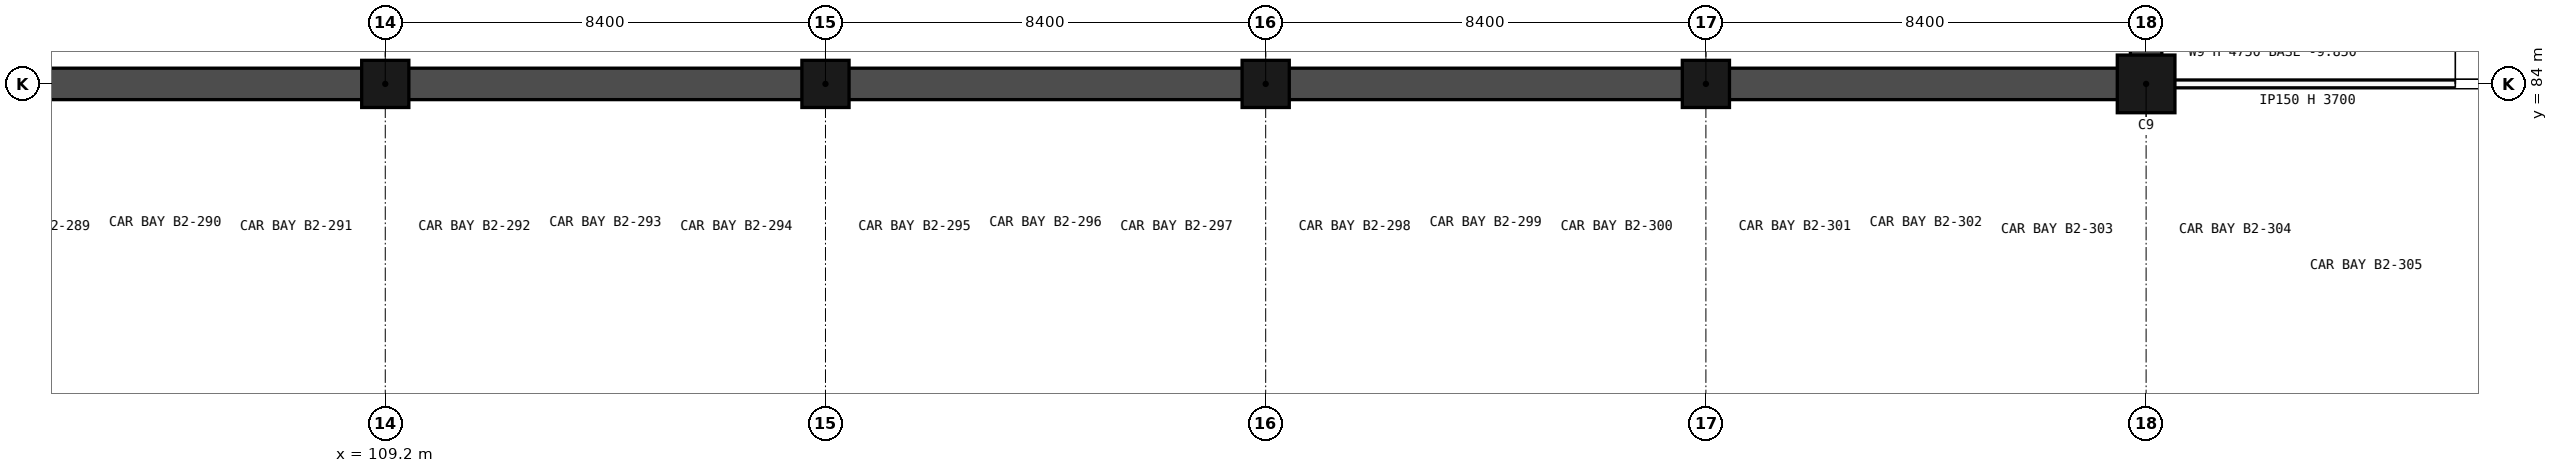
"""IFC4 building model, lengths in metres.
Left out: names, types, materials, properties, quantities, classifications, styles, units other than length and angle.
Written with IfcOpenShell. Run it as: python <this file> out.ifc"""

import sys

from ifc_helpers import new_model, si_unit, direction, frame, frame_2d, origin, origin_2d, place, context, subcontext, project, spatial, rectangle, extrude, element, fill, save


model = new_model("IFC4")
c1 = context("Model", 3, precision=1e-05, world=origin(), true_north=direction((0.0, 1.0)))
c2 = subcontext(c1, "Body", "Model", "MODEL_VIEW")
j1 = project(units=[si_unit("LENGTHUNIT", "METRE"), si_unit("PLANEANGLEUNIT", "RADIAN")], contexts=[c1])
p1 = place(None, origin())
s1 = spatial("IfcSite", under=j1, at=p1, CompositionType="ELEMENT")
p2 = place(p1, origin())
s2 = spatial("IfcBuilding", under=s1, at=p2, CompositionType="ELEMENT")
p3 = place(p2, frame((0.0, 0.0, -9.6)))
s3 = spatial("IfcBuildingStorey", under=s2, at=p3, CompositionType="ELEMENT", Elevation=-9.6)
for number, where, z_axis, x_axis in (
    (1, (109.2, 84.0, -0.25), (0.0, 0.0, 1.0), (1.0, 0.0, 0.0)),
    (2, (117.6, 84.0, -0.25), (0.0, 0.0, 1.0), (1.0, 0.0, 0.0)),
    (3, (126.0, 84.0, -0.25), (0.0, 0.0, 1.0), (1.0, 0.0, 0.0)),
    (4, (134.4, 84.0, -0.25), (0.0, 0.0, 1.0), (1.0, 0.0, 0.0)),
):
    element("IfcColumn", number, at=place(p3, frame(where, z_axis=z_axis, x_axis=x_axis)), inside=s3, PredefinedType="COLUMN", context=c2, shape_type="SweptSolid", body=[
        extrude(rectangle(XDim=0.9, YDim=0.9, at=origin_2d()), origin(), (0.0, 0.0, 1.0), 4.75),
    ])
p4 = place(p3, frame((142.8, 84.0, -0.25), z_axis=(0.0, 0.0, 1.0), x_axis=(1.0, 0.0, 0.0)))
e5 = element("IfcColumn", 5, at=p4, inside=s3, PredefinedType="COLUMN", context=c2, shape_type="SweptSolid", body=[
    extrude(rectangle(XDim=1.1, YDim=1.1, at=origin_2d()), origin(), (0.0, 0.0, 1.0), 4.75),
])
p5 = place(p3, frame((142.8, 117.9, -0.25), z_axis=(0.0, 0.0, 1.0), x_axis=(0.0, -1.0, 0.0)))
e6 = element("IfcWall", 6, at=p5, inside=s3, PredefinedType="SOLIDWALL", context=c2, shape_type="SweptSolid", body=[
    extrude(rectangle(XDim=34.2, YDim=0.6, at=frame_2d((17.1, 0.0))), origin(), (0.0, 0.0, 1.0), 4.75),
])
p6 = place(p3, frame((143.1, 84.0, -0.25), z_axis=(0.0, 0.0, 1.0), x_axis=(-1.0, 0.0, 0.0)))
e7 = element("IfcWall", 7, at=p6, inside=s3, PredefinedType="SOLIDWALL", context=c2, shape_type="SweptSolid", body=[
    extrude(rectangle(XDim=109.8, YDim=0.6, at=frame_2d((54.9, 0.0))), origin(), (0.0, 0.0, 1.0), 4.75),
])
p7 = place(p3, frame((143.1, 84.0, 0.0), z_axis=(0.0, 0.0, 1.0), x_axis=(1.0, 0.0, 0.0)))
e8 = element("IfcWall", 8, at=p7, inside=s3, PredefinedType="PARTITIONING", context=c2, shape_type="SweptSolid", body=[
    extrude(rectangle(XDim=13.9, YDim=0.15, at=frame_2d((6.95, 0.0))), origin(), (0.0, 0.0, 1.0), 3.7),
])
p8 = place(p7, frame((5.6, 0.0, 0.0)))
e9 = element("IfcOpeningElement", 9, at=p8, cuts=e8, PredefinedType="OPENING", context=c2, shape_type="SweptSolid", body=[
    extrude(rectangle(XDim=1.8, YDim=2.1, at=frame_2d((0.9, 1.05))), frame((0.0, 0.085, 0.0), z_axis=(0.0, -1.0, 0.0), x_axis=(1.0, 0.0, 0.0)), (0.0, 0.0, 1.0), 0.17),
])
p9 = place(p8, origin())
e10 = element("IfcDoor", 10, at=p9, inside=s3, OperationType="DOUBLE_DOOR_SINGLE_SWING", PredefinedType="DOOR", context=c2, shape_type="SweptSolid", body=[
    extrude(rectangle(XDim=1.8, YDim=2.1, at=frame_2d((0.9, 1.05))), frame((0.0, 0.025, 0.0), z_axis=(0.0, -1.0, 0.0), x_axis=(1.0, 0.0, 0.0)), (0.0, 0.0, 1.0), 0.05),
])
fill(e9, e10)
save(model, sys.argv[1])
